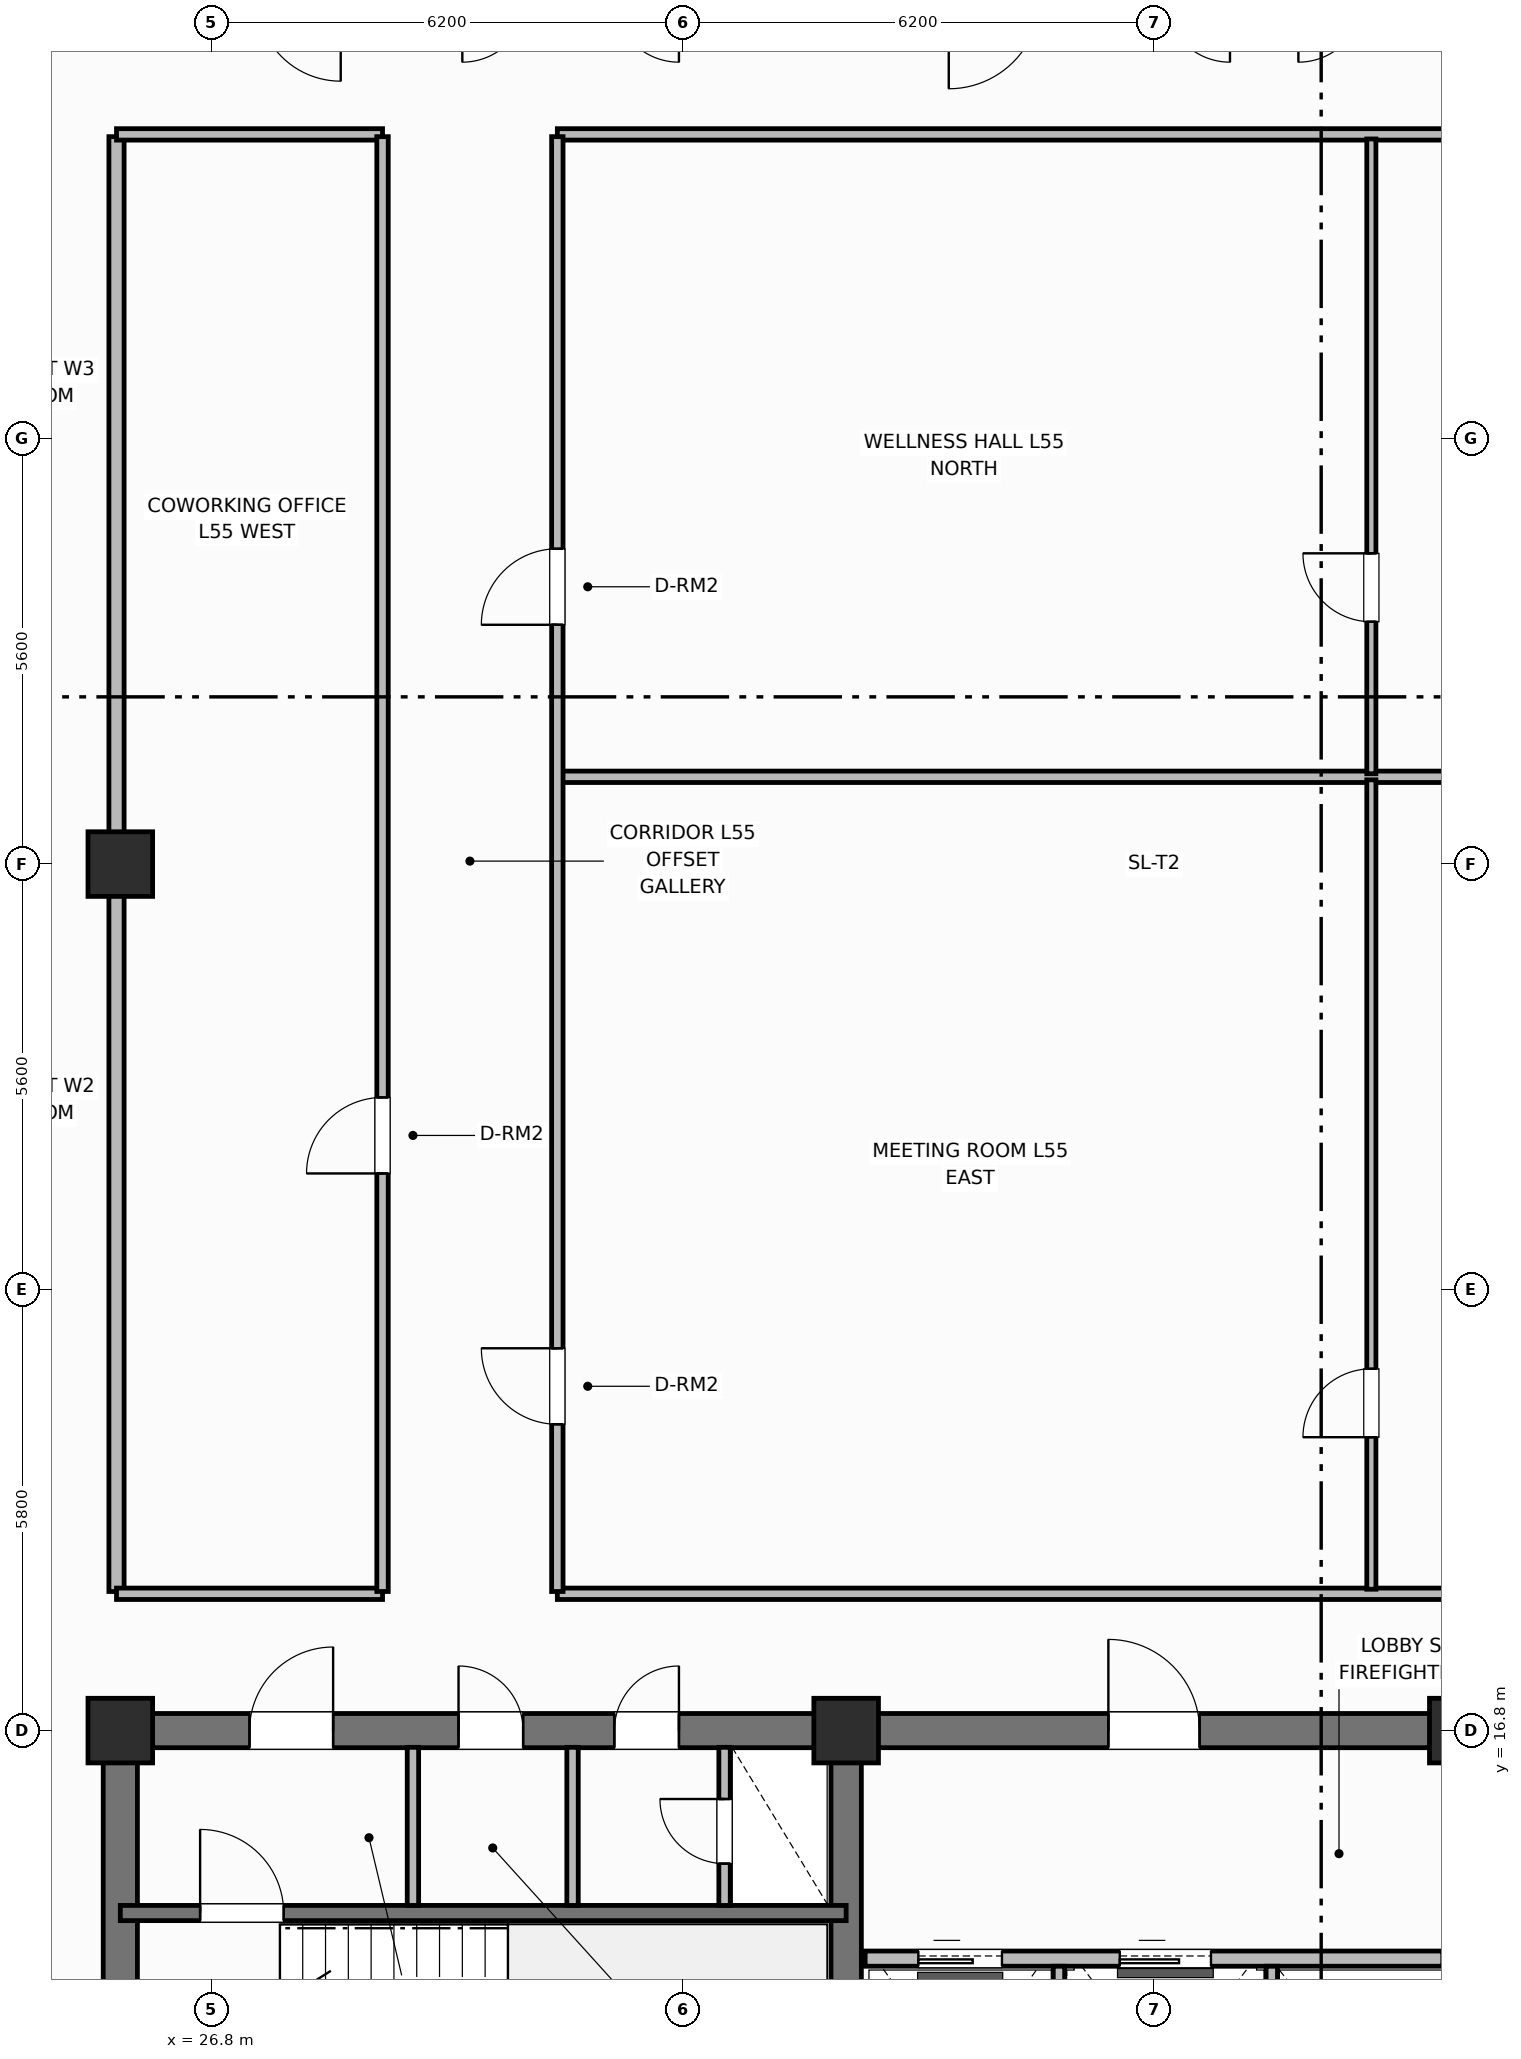
"""IFC4 building model, lengths in metres.
Left out: names, types, materials, properties, quantities, classifications, styles, units other than length and angle.
Written with IfcOpenShell. Run it as: python <this file> out.ifc"""

import sys

from ifc_helpers import new_model, si_unit, direction, frame, frame_2d, origin, origin_2d, place, context, subcontext, project, spatial, rectangle, extrude, element, fill, save


model = new_model("IFC4")
c1 = context("Model", 3, precision=1e-05, world=origin(), true_north=direction((0.0, 1.0)))
c2 = subcontext(c1, "Body", "Model", "MODEL_VIEW")
j1 = project(units=[si_unit("LENGTHUNIT", "METRE"), si_unit("PLANEANGLEUNIT", "RADIAN")], contexts=[c1])
p1 = place(None, origin())
s1 = spatial("IfcSite", under=j1, at=p1, CompositionType="ELEMENT")
p2 = place(p1, origin())
s2 = spatial("IfcBuilding", under=s1, at=p2, CompositionType="ELEMENT")
p3 = place(p2, frame((0.0, 0.0, 222.1)))
s3 = spatial("IfcBuildingStorey", under=s2, at=p3, CompositionType="ELEMENT", Elevation=222.1)
p4 = place(p3, frame((25.6, 10.825, 0.0), z_axis=(0.0, 0.0, 1.0), x_axis=(0.0, 1.0, 0.0)))
e1 = element("IfcWall", 1, at=p4, inside=s3, PredefinedType="SHEAR", context=c2, shape_type="SweptSolid", body=[
    extrude(rectangle(XDim=5.75, YDim=0.45, at=frame_2d((2.875, 0.0))), origin(), (0.0, 0.0, 1.0), 3.7),
])
p5 = place(p3, frame((25.6, 16.8, 0.0), z_axis=(0.0, 0.0, 1.0), x_axis=(1.0, 0.0, 0.0)))
e2 = element("IfcWall", 2, at=p5, inside=s3, PredefinedType="SHEAR", context=c2, shape_type="SweptSolid", body=[
    extrude(rectangle(XDim=27.2, YDim=0.45, at=frame_2d((13.6, 0.0))), origin(), (0.0, 0.0, 1.0), 3.7),
])
p6 = place(p5, frame((1.7, 0.0, 0.0)))
e3 = element("IfcOpeningElement", 3, at=p6, cuts=e2, PredefinedType="OPENING", context=c2, shape_type="SweptSolid", body=[
    extrude(rectangle(XDim=1.1, YDim=2.15, at=frame_2d((0.55, 1.075))), frame((0.0, 0.235, 0.0), z_axis=(0.0, -1.0, 0.0), x_axis=(1.0, 0.0, 0.0)), (0.0, 0.0, 1.0), 0.47),
])
p7 = place(p5, frame((4.45, 0.0, 0.0)))
e4 = element("IfcOpeningElement", 4, at=p7, cuts=e2, PredefinedType="OPENING", context=c2, shape_type="SweptSolid", body=[
    extrude(rectangle(XDim=0.85, YDim=2.1, at=frame_2d((0.425, 1.05))), frame((0.0, 0.235, 0.0), z_axis=(0.0, -1.0, 0.0), x_axis=(1.0, 0.0, 0.0)), (0.0, 0.0, 1.0), 0.47),
])
p8 = place(p5, frame((6.5, 0.0, 0.0)))
e5 = element("IfcOpeningElement", 5, at=p8, cuts=e2, PredefinedType="OPENING", context=c2, shape_type="SweptSolid", body=[
    extrude(rectangle(XDim=0.85, YDim=2.1, at=frame_2d((0.425, 1.05))), frame((0.0, 0.235, 0.0), z_axis=(0.0, -1.0, 0.0), x_axis=(1.0, 0.0, 0.0)), (0.0, 0.0, 1.0), 0.47),
])
p9 = place(p5, frame((13.0, 0.0, 0.0)))
e6 = element("IfcOpeningElement", 6, at=p9, cuts=e2, PredefinedType="OPENING", context=c2, shape_type="SweptSolid", body=[
    extrude(rectangle(XDim=1.2, YDim=2.15, at=frame_2d((0.6, 1.075))), frame((0.0, 0.235, 0.0), z_axis=(0.0, -1.0, 0.0), x_axis=(1.0, 0.0, 0.0)), (0.0, 0.0, 1.0), 0.47),
])
p10 = place(p5, frame((19.8, 0.0, 0.0)))
e7 = element("IfcOpeningElement", 7, at=p10, cuts=e2, PredefinedType="OPENING", context=c2, shape_type="SweptSolid", body=[
    extrude(rectangle(XDim=0.85, YDim=2.1, at=frame_2d((0.425, 1.05))), frame((0.0, 0.235, 0.0), z_axis=(0.0, -1.0, 0.0), x_axis=(1.0, 0.0, 0.0)), (0.0, 0.0, 1.0), 0.47),
])
p11 = place(p5, frame((24.2, 0.0, 0.0)))
e8 = element("IfcOpeningElement", 8, at=p11, cuts=e2, PredefinedType="OPENING", context=c2, shape_type="SweptSolid", body=[
    extrude(rectangle(XDim=0.85, YDim=2.1, at=frame_2d((0.425, 1.05))), frame((0.0, 0.235, 0.0), z_axis=(0.0, -1.0, 0.0), x_axis=(1.0, 0.0, 0.0)), (0.0, 0.0, 1.0), 0.47),
])
p12 = place(p3, frame((35.15, 10.825, 0.0), z_axis=(0.0, 0.0, 1.0), x_axis=(0.0, 1.0, 0.0)))
e9 = element("IfcWall", 9, at=p12, inside=s3, PredefinedType="SHEAR", context=c2, shape_type="SweptSolid", body=[
    extrude(rectangle(XDim=5.75, YDim=0.4, at=frame_2d((2.875, 0.0))), origin(), (0.0, 0.0, 1.0), 3.7),
])
for number, where, z_axis, x_axis in (
    (10, (25.6, 16.8, 0.0), (0.0, 0.0, 1.0), (1.0, 0.0, 0.0)),
    (11, (35.15, 16.8, 0.0), (0.0, 0.0, 1.0), (1.0, 0.0, 0.0)),
    (12, (43.25, 16.8, 0.0), (0.0, 0.0, 1.0), (1.0, 0.0, 0.0)),
    (13, (25.6, 28.2, 0.0), (0.0, 0.0, 1.0), (1.0, 0.0, 0.0)),
):
    element("IfcColumn", number, at=place(p3, frame(where, z_axis=z_axis, x_axis=x_axis)), inside=s3, PredefinedType="COLUMN", context=c2, shape_type="SweptSolid", body=[
        extrude(rectangle(XDim=0.85, YDim=0.85, at=origin_2d()), origin(), (0.0, 0.0, 1.0), 3.7),
    ])
p13 = place(p3, frame((25.6, 14.4, 0.0), z_axis=(0.0, 0.0, 1.0), x_axis=(1.0, 0.0, 0.0)))
e14 = element("IfcWall", 14, at=p13, inside=s3, PredefinedType="SHEAR", context=c2, shape_type="SweptSolid", body=[
    extrude(rectangle(XDim=9.55, YDim=0.2, at=frame_2d((4.775, 0.0))), origin(), (0.0, 0.0, 1.0), 3.7),
])
p14 = place(p13, frame((1.05, 0.0, 0.0)))
e15 = element("IfcOpeningElement", 15, at=p14, cuts=e14, PredefinedType="OPENING", context=c2, shape_type="SweptSolid", body=[
    extrude(rectangle(XDim=1.1, YDim=2.15, at=frame_2d((0.55, 1.075))), frame((0.0, 0.11, 0.0), z_axis=(0.0, -1.0, 0.0), x_axis=(1.0, 0.0, 0.0)), (0.0, 0.0, 1.0), 0.22),
])
for number, where, z_axis, x_axis in (
    (16, (29.45, 14.5, 0.0), (0.0, 0.0, 1.0), (0.0, 1.0, 0.0)),
    (17, (31.55, 14.5, 0.0), (0.0, 0.0, 1.0), (0.0, 1.0, 0.0)),
):
    element("IfcWall", number, at=place(p3, frame(where, z_axis=z_axis, x_axis=x_axis)), inside=s3, PredefinedType="PARTITIONING", context=c2, shape_type="SweptSolid", body=[
        extrude(rectangle(XDim=2.08, YDim=0.15, at=frame_2d((1.04, 0.0))), origin(), (0.0, 0.0, 1.0), 2.24),
    ])
p15 = place(p3, frame((33.55, 14.5, 0.0), z_axis=(0.0, 0.0, 1.0), x_axis=(0.0, 1.0, 0.0)))
e18 = element("IfcWall", 18, at=p15, inside=s3, PredefinedType="PARTITIONING", context=c2, shape_type="SweptSolid", body=[
    extrude(rectangle(XDim=2.08, YDim=0.15, at=frame_2d((1.04, 0.0))), origin(), (0.0, 0.0, 1.0), 2.24),
])
p16 = place(p15, frame((0.55, 0.0, 0.0)))
e19 = element("IfcOpeningElement", 19, at=p16, cuts=e18, PredefinedType="OPENING", context=c2, shape_type="SweptSolid", body=[
    extrude(rectangle(XDim=0.85, YDim=2.05, at=frame_2d((0.425, 1.025))), frame((0.0, 0.085, 0.0), z_axis=(0.0, -1.0, 0.0), x_axis=(1.0, 0.0, 0.0)), (0.0, 0.0, 1.0), 0.17),
])
p17 = place(p3, frame((35.4, 13.8, 0.0), z_axis=(0.0, 0.0, 1.0), x_axis=(1.0, 0.0, 0.0)))
e20 = element("IfcWall", 20, at=p17, inside=s3, PredefinedType="PARTITIONING", context=c2, shape_type="SweptSolid", body=[
    extrude(rectangle(XDim=7.6, YDim=0.2, at=frame_2d((3.8, 0.0))), origin(), (0.0, 0.0, 1.0), 2.18),
])
p18 = place(p17, frame((0.7, 0.0, 0.0)))
e21 = element("IfcOpeningElement", 21, at=p18, cuts=e20, PredefinedType="OPENING", context=c2, shape_type="SweptSolid", body=[
    extrude(rectangle(XDim=1.1, YDim=2.15, at=frame_2d((0.55, 1.075))), frame((0.0, 0.11, 0.0), z_axis=(0.0, -1.0, 0.0), x_axis=(1.0, 0.0, 0.0)), (0.0, 0.0, 1.0), 0.22),
])
p19 = place(p17, frame((3.35, 0.0, 0.0)))
e22 = element("IfcOpeningElement", 22, at=p19, cuts=e20, PredefinedType="OPENING", context=c2, shape_type="SweptSolid", body=[
    extrude(rectangle(XDim=1.2, YDim=2.15, at=frame_2d((0.6, 1.075))), frame((0.0, 0.11, 0.0), z_axis=(0.0, -1.0, 0.0), x_axis=(1.0, 0.0, 0.0)), (0.0, 0.0, 1.0), 0.22),
])
for number, where, z_axis, x_axis in (
    (23, (37.95, 10.95, 0.0), (0.0, 0.0, 1.0), (0.0, 1.0, 0.0)),
    (24, (40.75, 10.95, 0.0), (0.0, 0.0, 1.0), (0.0, 1.0, 0.0)),
):
    element("IfcWall", number, at=place(p3, frame(where, z_axis=z_axis, x_axis=x_axis)), inside=s3, PredefinedType="PARTITIONING", context=c2, shape_type="SweptSolid", body=[
        extrude(rectangle(XDim=2.75, YDim=0.15, at=frame_2d((1.375, 0.0))), origin(), (0.0, 0.0, 1.0), 2.24),
    ])
p20 = place(p3, frame((25.55, 18.63, 0.0), z_axis=(0.0, 0.0, 1.0), x_axis=(0.0, 1.0, 0.0)))
e25 = element("IfcWall", 25, at=p20, inside=s3, PredefinedType="PARTITIONING", context=c2, shape_type="SweptSolid", body=[
    extrude(rectangle(XDim=19.14, YDim=0.2, at=frame_2d((9.57, 0.0))), origin(), (0.0, 0.0, 1.0), 2.24),
])
p21 = place(p3, frame((25.55, 18.6, 0.0), z_axis=(0.0, 0.0, 1.0), x_axis=(1.0, 0.0, 0.0)))
e26 = element("IfcWall", 26, at=p21, inside=s3, PredefinedType="PARTITIONING", context=c2, shape_type="SweptSolid", body=[
    extrude(rectangle(XDim=3.5, YDim=0.15, at=frame_2d((1.75, 0.0))), origin(), (0.0, 0.0, 1.0), 2.24),
])
p22 = place(p3, frame((31.35, 18.6, 0.0), z_axis=(0.0, 0.0, 1.0), x_axis=(1.0, 0.0, 0.0)))
e27 = element("IfcWall", 27, at=p22, inside=s3, PredefinedType="PARTITIONING", context=c2, shape_type="SweptSolid", body=[
    extrude(rectangle(XDim=21.5, YDim=0.15, at=frame_2d((10.75, 0.0))), origin(), (0.0, 0.0, 1.0), 2.24),
])
p23 = place(p3, frame((25.55, 37.8, 0.0), z_axis=(0.0, 0.0, 1.0), x_axis=(1.0, 0.0, 0.0)))
e28 = element("IfcWall", 28, at=p23, inside=s3, PredefinedType="PARTITIONING", context=c2, shape_type="SweptSolid", body=[
    extrude(rectangle(XDim=3.5, YDim=0.15, at=frame_2d((1.75, 0.0))), origin(), (0.0, 0.0, 1.0), 2.24),
])
p24 = place(p3, frame((31.35, 37.8, 0.0), z_axis=(0.0, 0.0, 1.0), x_axis=(1.0, 0.0, 0.0)))
e29 = element("IfcWall", 29, at=p24, inside=s3, PredefinedType="PARTITIONING", context=c2, shape_type="SweptSolid", body=[
    extrude(rectangle(XDim=21.5, YDim=0.15, at=frame_2d((10.75, 0.0))), origin(), (0.0, 0.0, 1.0), 2.24),
])
p25 = place(p3, frame((31.38, 29.348, 0.0), z_axis=(0.0, 0.0, 1.0), x_axis=(1.0, 0.0, 0.0)))
e30 = element("IfcWall", 30, at=p25, inside=s3, PredefinedType="PARTITIONING", context=c2, shape_type="SweptSolid", body=[
    extrude(rectangle(XDim=21.42, YDim=0.15, at=frame_2d((10.71, 0.0))), origin(), (0.0, 0.0, 1.0), 2.24),
])
p26 = place(p3, frame((42.06, 18.66, 0.0), z_axis=(0.0, 0.0, 1.0), x_axis=(0.0, 1.0, 0.0)))
e31 = element("IfcWall", 31, at=p26, inside=s3, PredefinedType="PARTITIONING", context=c2, shape_type="SweptSolid", body=[
    extrude(rectangle(XDim=10.648, YDim=0.12, at=frame_2d((5.324, 0.0))), origin(), (0.0, 0.0, 1.0), 2.24),
])
p27 = place(p26, frame((2.0, 0.0, 0.0)))
e32 = element("IfcOpeningElement", 32, at=p27, cuts=e31, PredefinedType="OPENING", context=c2, shape_type="SweptSolid", body=[
    extrude(rectangle(XDim=0.9, YDim=2.1, at=frame_2d((0.45, 1.05))), frame((0.0, 0.07, 0.0), z_axis=(0.0, -1.0, 0.0), x_axis=(1.0, 0.0, 0.0)), (0.0, 0.0, 1.0), 0.14),
])
p28 = place(p3, frame((42.06, 29.388, 0.0), z_axis=(0.0, 0.0, 1.0), x_axis=(0.0, 1.0, 0.0)))
e33 = element("IfcWall", 33, at=p28, inside=s3, PredefinedType="PARTITIONING", context=c2, shape_type="SweptSolid", body=[
    extrude(rectangle(XDim=8.352, YDim=0.12, at=frame_2d((4.176, 0.0))), origin(), (0.0, 0.0, 1.0), 2.24),
])
p29 = place(p28, frame((2.0, 0.0, 0.0)))
e34 = element("IfcOpeningElement", 34, at=p29, cuts=e33, PredefinedType="OPENING", context=c2, shape_type="SweptSolid", body=[
    extrude(rectangle(XDim=0.9, YDim=2.1, at=frame_2d((0.45, 1.05))), frame((0.0, 0.07, 0.0), z_axis=(0.0, -1.0, 0.0), x_axis=(1.0, 0.0, 0.0)), (0.0, 0.0, 1.0), 0.14),
])
p30 = place(p3, frame((29.05, 18.63, 0.0), z_axis=(0.0, 0.0, 1.0), x_axis=(0.0, 1.0, 0.0)))
e35 = element("IfcWall", 35, at=p30, inside=s3, PredefinedType="PARTITIONING", context=c2, shape_type="SweptSolid", body=[
    extrude(rectangle(XDim=19.14, YDim=0.15, at=frame_2d((9.57, 0.0))), origin(), (0.0, 0.0, 1.0), 2.24),
])
p31 = place(p30, frame((5.5, 0.0, 0.0)))
e36 = element("IfcOpeningElement", 36, at=p31, cuts=e35, PredefinedType="OPENING", context=c2, shape_type="SweptSolid", body=[
    extrude(rectangle(XDim=1.0, YDim=2.15, at=frame_2d((0.5, 1.075))), frame((0.0, 0.085, 0.0), z_axis=(0.0, -1.0, 0.0), x_axis=(1.0, 0.0, 0.0)), (0.0, 0.0, 1.0), 0.17),
])
p32 = place(p3, frame((31.35, 18.63, 0.0), z_axis=(0.0, 0.0, 1.0), x_axis=(0.0, 1.0, 0.0)))
e37 = element("IfcWall", 37, at=p32, inside=s3, PredefinedType="PARTITIONING", context=c2, shape_type="SweptSolid", body=[
    extrude(rectangle(XDim=19.14, YDim=0.15, at=frame_2d((9.57, 0.0))), origin(), (0.0, 0.0, 1.0), 2.24),
])
p33 = place(p32, frame((2.2, 0.0, 0.0)))
e38 = element("IfcOpeningElement", 38, at=p33, cuts=e37, PredefinedType="OPENING", context=c2, shape_type="SweptSolid", body=[
    extrude(rectangle(XDim=1.0, YDim=2.15, at=frame_2d((0.5, 1.075))), frame((0.0, 0.085, 0.0), z_axis=(0.0, -1.0, 0.0), x_axis=(1.0, 0.0, 0.0)), (0.0, 0.0, 1.0), 0.17),
])
p34 = place(p32, frame((12.719, 0.0, 0.0)))
e39 = element("IfcOpeningElement", 39, at=p34, cuts=e37, PredefinedType="OPENING", context=c2, shape_type="SweptSolid", body=[
    extrude(rectangle(XDim=1.0, YDim=2.15, at=frame_2d((0.5, 1.075))), frame((0.0, 0.085, 0.0), z_axis=(0.0, -1.0, 0.0), x_axis=(1.0, 0.0, 0.0)), (0.0, 0.0, 1.0), 0.17),
])
p35 = place(p14, origin())
e40 = element("IfcDoor", 40, at=p35, inside=s3, OperationType="SINGLE_SWING_LEFT", PredefinedType="DOOR", context=c2, shape_type="SweptSolid", body=[
    extrude(rectangle(XDim=1.1, YDim=2.15, at=frame_2d((0.55, 1.075))), frame((0.0, 0.025, 0.0), z_axis=(0.0, -1.0, 0.0), x_axis=(1.0, 0.0, 0.0)), (0.0, 0.0, 1.0), 0.05),
])
fill(e15, e40)
p36 = place(p16, origin())
e41 = element("IfcDoor", 41, at=p36, inside=s3, OperationType="SINGLE_SWING_RIGHT", PredefinedType="TRAPDOOR", context=c2, shape_type="SweptSolid", body=[
    extrude(rectangle(XDim=0.85, YDim=2.05, at=frame_2d((0.425, 1.025))), frame((0.0, 0.025, 0.0), z_axis=(0.0, -1.0, 0.0), x_axis=(1.0, 0.0, 0.0)), (0.0, 0.0, 1.0), 0.05),
])
fill(e19, e41)
p37 = place(p18, origin())
e42 = element("IfcDoor", 42, at=p37, inside=s3, OperationType="SLIDING_TO_LEFT", PredefinedType="DOOR", context=c2, shape_type="SweptSolid", body=[
    extrude(rectangle(XDim=1.1, YDim=2.15, at=frame_2d((0.55, 1.075))), frame((0.0, 0.025, 0.0), z_axis=(0.0, -1.0, 0.0), x_axis=(1.0, 0.0, 0.0)), (0.0, 0.0, 1.0), 0.05),
])
fill(e21, e42)
p38 = place(p19, origin())
e43 = element("IfcDoor", 43, at=p38, inside=s3, OperationType="SLIDING_TO_LEFT", PredefinedType="DOOR", context=c2, shape_type="SweptSolid", body=[
    extrude(rectangle(XDim=1.2, YDim=2.15, at=frame_2d((0.6, 1.075))), frame((0.0, 0.025, 0.0), z_axis=(0.0, -1.0, 0.0), x_axis=(1.0, 0.0, 0.0)), (0.0, 0.0, 1.0), 0.05),
])
fill(e22, e43)
p39 = place(p27, origin())
e44 = element("IfcDoor", 44, at=p39, inside=s3, OperationType="SINGLE_SWING_LEFT", PredefinedType="DOOR", context=c2, shape_type="SweptSolid", body=[
    extrude(rectangle(XDim=0.9, YDim=2.1, at=frame_2d((0.45, 1.05))), frame((0.0, 0.025, 0.0), z_axis=(0.0, -1.0, 0.0), x_axis=(1.0, 0.0, 0.0)), (0.0, 0.0, 1.0), 0.05),
])
fill(e32, e44)
p40 = place(p29, origin())
e45 = element("IfcDoor", 45, at=p40, inside=s3, OperationType="SINGLE_SWING_RIGHT", PredefinedType="DOOR", context=c2, shape_type="SweptSolid", body=[
    extrude(rectangle(XDim=0.9, YDim=2.1, at=frame_2d((0.45, 1.05))), frame((0.0, 0.025, 0.0), z_axis=(0.0, -1.0, 0.0), x_axis=(1.0, 0.0, 0.0)), (0.0, 0.0, 1.0), 0.05),
])
fill(e34, e45)
p41 = place(p31, origin())
e46 = element("IfcDoor", 46, at=p41, inside=s3, OperationType="SINGLE_SWING_LEFT", PredefinedType="DOOR", context=c2, shape_type="SweptSolid", body=[
    extrude(rectangle(XDim=1.0, YDim=2.15, at=frame_2d((0.5, 1.075))), frame((0.0, 0.025, 0.0), z_axis=(0.0, -1.0, 0.0), x_axis=(1.0, 0.0, 0.0)), (0.0, 0.0, 1.0), 0.05),
])
fill(e36, e46)
p42 = place(p33, origin())
e47 = element("IfcDoor", 47, at=p42, inside=s3, OperationType="SINGLE_SWING_RIGHT", PredefinedType="DOOR", context=c2, shape_type="SweptSolid", body=[
    extrude(rectangle(XDim=1.0, YDim=2.15, at=frame_2d((0.5, 1.075))), frame((0.0, 0.025, 0.0), z_axis=(0.0, -1.0, 0.0), x_axis=(1.0, 0.0, 0.0)), (0.0, 0.0, 1.0), 0.05),
])
fill(e38, e47)
p43 = place(p34, origin())
e48 = element("IfcDoor", 48, at=p43, inside=s3, OperationType="SINGLE_SWING_LEFT", PredefinedType="DOOR", context=c2, shape_type="SweptSolid", body=[
    extrude(rectangle(XDim=1.0, YDim=2.15, at=frame_2d((0.5, 1.075))), frame((0.0, 0.025, 0.0), z_axis=(0.0, -1.0, 0.0), x_axis=(1.0, 0.0, 0.0)), (0.0, 0.0, 1.0), 0.05),
])
fill(e39, e48)
p44 = place(p6, origin())
e49 = element("IfcDoor", 49, at=p44, inside=s3, OperationType="SINGLE_SWING_RIGHT", PredefinedType="DOOR", context=c2, shape_type="SweptSolid", body=[
    extrude(rectangle(XDim=1.1, YDim=2.15, at=frame_2d((0.55, 1.075))), frame((0.0, 0.025, 0.0), z_axis=(0.0, -1.0, 0.0), x_axis=(1.0, 0.0, 0.0)), (0.0, 0.0, 1.0), 0.05),
])
fill(e3, e49)
p45 = place(p7, origin())
e50 = element("IfcDoor", 50, at=p45, inside=s3, OperationType="SINGLE_SWING_LEFT", PredefinedType="DOOR", context=c2, shape_type="SweptSolid", body=[
    extrude(rectangle(XDim=0.85, YDim=2.1, at=frame_2d((0.425, 1.05))), frame((0.0, 0.025, 0.0), z_axis=(0.0, -1.0, 0.0), x_axis=(1.0, 0.0, 0.0)), (0.0, 0.0, 1.0), 0.05),
])
fill(e4, e50)
p46 = place(p8, origin())
e51 = element("IfcDoor", 51, at=p46, inside=s3, OperationType="SINGLE_SWING_RIGHT", PredefinedType="DOOR", context=c2, shape_type="SweptSolid", body=[
    extrude(rectangle(XDim=0.85, YDim=2.1, at=frame_2d((0.425, 1.05))), frame((0.0, 0.025, 0.0), z_axis=(0.0, -1.0, 0.0), x_axis=(1.0, 0.0, 0.0)), (0.0, 0.0, 1.0), 0.05),
])
fill(e5, e51)
p47 = place(p9, origin())
e52 = element("IfcDoor", 52, at=p47, inside=s3, OperationType="SINGLE_SWING_LEFT", PredefinedType="DOOR", context=c2, shape_type="SweptSolid", body=[
    extrude(rectangle(XDim=1.2, YDim=2.15, at=frame_2d((0.6, 1.075))), frame((0.0, 0.025, 0.0), z_axis=(0.0, -1.0, 0.0), x_axis=(1.0, 0.0, 0.0)), (0.0, 0.0, 1.0), 0.05),
])
fill(e6, e52)
save(model, sys.argv[1])
